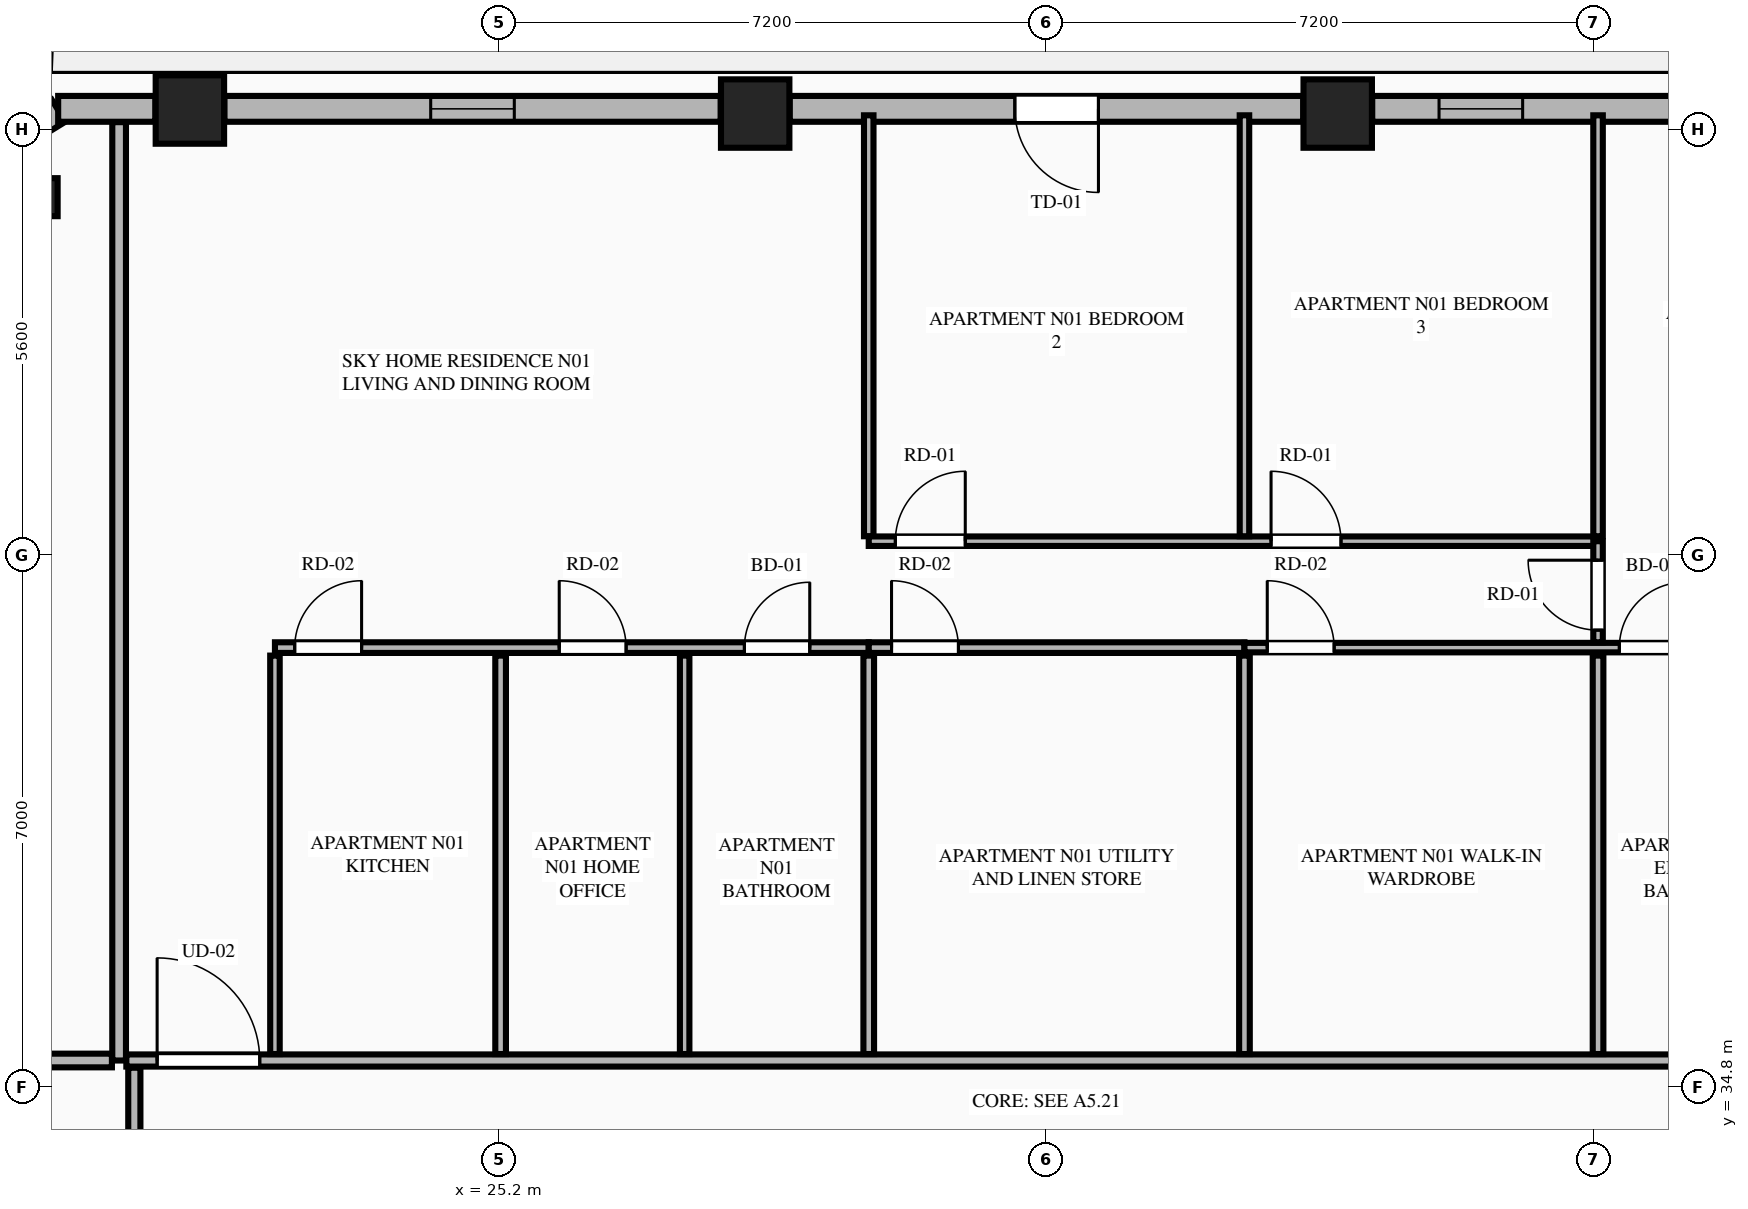
"""IFC4 building model, lengths in metres.
Left out: names, types, materials, properties, quantities, classifications, styles, units other than length and angle.
Written with IfcOpenShell. Run it as: python <this file> out.ifc"""

import sys

from ifc_helpers import new_model, si_unit, direction, frame, frame_2d, origin, origin_2d, place, context, subcontext, project, spatial, rectangle, extrude, element, fill, save


model = new_model("IFC4")
c1 = context("Model", 3, precision=1e-05, world=origin(), true_north=direction((0.0, 1.0)))
c2 = subcontext(c1, "Body", "Model", "MODEL_VIEW")
j1 = project(units=[si_unit("LENGTHUNIT", "METRE"), si_unit("PLANEANGLEUNIT", "RADIAN")], contexts=[c1])
p1 = place(None, origin())
s1 = spatial("IfcSite", under=j1, at=p1, CompositionType="ELEMENT")
p2 = place(p1, origin())
s2 = spatial("IfcBuilding", under=s1, at=p2, CompositionType="ELEMENT")
p3 = place(p2, frame((0.0, 0.0, 160.6)))
s3 = spatial("IfcBuildingStorey", under=s2, at=p3, CompositionType="ELEMENT", Elevation=160.6)
for number, where, z_axis, x_axis in (
    (1, (36.232, 47.608, 0.0), (0.0, 0.0, 1.0), (1.0, 0.0, 0.0)),
    (2, (28.568, 47.608, 0.0), (0.0, 0.0, 1.0), (1.0, 0.0, 0.0)),
    (3, (21.131, 47.661, 0.0), (0.0, 0.0, 1.0), (1.0, 0.0, 0.0)),
):
    element("IfcColumn", number, at=place(p3, frame(where, z_axis=z_axis, x_axis=x_axis)), inside=s3, PredefinedType="COLUMN", context=c2, shape_type="SweptSolid", body=[
        extrude(rectangle(XDim=0.9, YDim=0.9, at=origin_2d()), origin(), (0.0, 0.0, 1.0), 3.55),
    ])
p4 = place(p3, frame((19.141, 46.508, 0.0), z_axis=(0.0, 0.0, 1.0), x_axis=(-0.865160173452, -0.501495637342, 0.0)))
e4 = element("IfcColumn", 4, at=p4, inside=s3, PredefinedType="PILASTER", context=c2, shape_type="SweptSolid", body=[
    extrude(rectangle(XDim=0.5, YDim=0.35, at=origin_2d()), origin(), (0.0, 0.0, 1.0), 3.55),
])
p5 = place(p3, frame((19.403, 47.645, 0.0), z_axis=(0.0, 0.0, 1.0), x_axis=(-0.851798915137, -0.523868884523, 0.0)))
e5 = element("IfcWall", 5, at=p5, inside=s3, PredefinedType="STANDARD", context=c2, shape_type="SweptSolid", body=[
    extrude(rectangle(XDim=1.848, YDim=0.34, at=frame_2d((0.924, 0.0))), origin(), (0.0, 0.0, 1.0), 3.34),
])
p6 = place(p3, frame((43.215, 47.67, 0.0), z_axis=(0.0, 0.0, 1.0), x_axis=(-1.0, 0.0, 0.0)))
e6 = element("IfcWall", 6, at=p6, inside=s3, PredefinedType="STANDARD", context=c2, shape_type="SweptSolid", body=[
    extrude(rectangle(XDim=6.529, YDim=0.34, at=frame_2d((3.265, 0.0))), origin(), (0.0, 0.0, 1.0), 2.797),
])
p7 = place(p6, frame((1.173, 0.0, 0.75)))
e7 = element("IfcOpeningElement", 7, at=p7, cuts=e6, PredefinedType="OPENING", context=c2, shape_type="SweptSolid", body=[
    extrude(rectangle(XDim=1.1, YDim=1.897, at=frame_2d((0.55, 0.948))), frame((0.0, 0.18, 0.0), z_axis=(0.0, -1.0, 0.0), x_axis=(1.0, 0.0, 0.0)), (0.0, 0.0, 1.0), 0.36),
])
p8 = place(p6, frame((4.55, 0.0, 0.75)))
e8 = element("IfcOpeningElement", 8, at=p8, cuts=e6, PredefinedType="OPENING", context=c2, shape_type="SweptSolid", body=[
    extrude(rectangle(XDim=1.1, YDim=1.897, at=frame_2d((0.55, 0.948))), frame((0.0, 0.18, 0.0), z_axis=(0.0, -1.0, 0.0), x_axis=(1.0, 0.0, 0.0)), (0.0, 0.0, 1.0), 0.36),
])
p9 = place(p3, frame((35.778, 47.67, 0.0), z_axis=(0.0, 0.0, 1.0), x_axis=(-1.0, 0.0, 0.0)))
e9 = element("IfcWall", 9, at=p9, inside=s3, PredefinedType="STANDARD", context=c2, shape_type="SweptSolid", body=[
    extrude(rectangle(XDim=6.756, YDim=0.34, at=frame_2d((3.378, 0.0))), origin(), (0.0, 0.0, 1.0), 2.797),
])
p10 = place(p9, frame((2.694, 0.0, 0.0)))
e10 = element("IfcOpeningElement", 10, at=p10, cuts=e9, PredefinedType="OPENING", context=c2, shape_type="SweptSolid", body=[
    extrude(rectangle(XDim=1.1, YDim=2.25, at=frame_2d((0.55, 1.125))), frame((0.0, 0.18, 0.0), z_axis=(0.0, -1.0, 0.0), x_axis=(1.0, 0.0, 0.0)), (0.0, 0.0, 1.0), 0.36),
])
p11 = place(p3, frame((28.114, 47.67, 0.0), z_axis=(0.0, 0.0, 1.0), x_axis=(-1.0, 0.0, 0.0)))
e11 = element("IfcWall", 11, at=p11, inside=s3, PredefinedType="STANDARD", context=c2, shape_type="SweptSolid", body=[
    extrude(rectangle(XDim=6.529, YDim=0.34, at=frame_2d((3.265, 0.0))), origin(), (0.0, 0.0, 1.0), 2.797),
])
p12 = place(p11, frame((2.715, 0.0, 0.75)))
e12 = element("IfcOpeningElement", 12, at=p12, cuts=e11, PredefinedType="OPENING", context=c2, shape_type="SweptSolid", body=[
    extrude(rectangle(XDim=1.1, YDim=1.897, at=frame_2d((0.55, 0.948))), frame((0.0, 0.18, 0.0), z_axis=(0.0, -1.0, 0.0), x_axis=(1.0, 0.0, 0.0)), (0.0, 0.0, 1.0), 0.36),
])
p13 = place(p3, frame((20.677, 47.67, 0.0), z_axis=(0.0, 0.0, 1.0), x_axis=(-1.0, 0.0, 0.0)))
e13 = element("IfcWall", 13, at=p13, inside=s3, PredefinedType="STANDARD", context=c2, shape_type="SweptSolid", body=[
    extrude(rectangle(XDim=1.279, YDim=0.34, at=frame_2d((0.64, 0.0))), origin(), (0.0, 0.0, 1.0), 3.34),
])
p14 = place(p3, frame((20.2, 35.15, 0.0), z_axis=(0.0, 0.0, 1.0), x_axis=(0.0, 1.0, 0.0)))
e14 = element("IfcWall", 14, at=p14, inside=s3, PredefinedType="PARTITIONING", context=c2, shape_type="SweptSolid", body=[
    extrude(rectangle(XDim=12.345, YDim=0.18, at=frame_2d((6.173, 0.0))), origin(), (0.0, 0.0, 1.0), 3.34),
])
p15 = place(p3, frame((20.295, 35.15, 0.0), z_axis=(0.0, 0.0, 1.0), x_axis=(1.0, 0.0, 0.0)))
e15 = element("IfcWall", 15, at=p15, inside=s3, PredefinedType="PARTITIONING", context=c2, shape_type="SweptSolid", body=[
    extrude(rectangle(XDim=24.21, YDim=0.16, at=frame_2d((12.105, 0.0))), origin(), (0.0, 0.0, 1.0), 3.34),
])
p16 = place(p15, frame((0.405, 0.0, 0.0)))
e16 = element("IfcOpeningElement", 16, at=p16, cuts=e15, PredefinedType="OPENING", context=c2, shape_type="SweptSolid", body=[
    extrude(rectangle(XDim=1.35, YDim=2.35, at=frame_2d((0.675, 1.175))), frame((0.0, 0.09, 0.0), z_axis=(0.0, -1.0, 0.0), x_axis=(1.0, 0.0, 0.0)), (0.0, 0.0, 1.0), 0.18),
])
p17 = place(p3, frame((22.25, 35.235, 0.0), z_axis=(0.0, 0.0, 1.0), x_axis=(0.0, 1.0, 0.0)))
e17 = element("IfcWall", 17, at=p17, inside=s3, PredefinedType="PARTITIONING", context=c2, shape_type="SweptSolid", body=[
    extrude(rectangle(XDim=5.242, YDim=0.125, at=frame_2d((2.621, 0.0))), origin(), (0.0, 0.0, 1.0), 2.722),
])
p18 = place(p3, frame((22.25, 40.582, 0.0), z_axis=(0.0, 0.0, 1.0), x_axis=(1.0, 0.0, 0.0)))
e18 = element("IfcWall", 18, at=p18, inside=s3, PredefinedType="PLUMBINGWALL", context=c2, shape_type="SweptSolid", body=[
    extrude(rectangle(XDim=7.812, YDim=0.14, at=frame_2d((3.906, 0.0))), origin(), (0.0, 0.0, 1.0), 3.34),
])
p19 = place(p18, frame((6.176, 0.0, 0.0)))
e19 = element("IfcOpeningElement", 19, at=p19, cuts=e18, PredefinedType="OPENING", context=c2, shape_type="SweptSolid", body=[
    extrude(rectangle(XDim=0.86, YDim=2.1, at=frame_2d((0.43, 1.05))), frame((0.0, 0.08, 0.0), z_axis=(0.0, -1.0, 0.0), x_axis=(1.0, 0.0, 0.0)), (0.0, 0.0, 1.0), 0.16),
])
p20 = place(p18, frame((0.26, 0.0, 0.0)))
e20 = element("IfcOpeningElement", 20, at=p20, cuts=e18, PredefinedType="OPENING", context=c2, shape_type="SweptSolid", body=[
    extrude(rectangle(XDim=0.88, YDim=2.15, at=frame_2d((0.44, 1.075))), frame((0.0, 0.08, 0.0), z_axis=(0.0, -1.0, 0.0), x_axis=(1.0, 0.0, 0.0)), (0.0, 0.0, 1.0), 0.16),
])
p21 = place(p18, frame((3.74, 0.0, 0.0)))
e21 = element("IfcOpeningElement", 21, at=p21, cuts=e18, PredefinedType="OPENING", context=c2, shape_type="SweptSolid", body=[
    extrude(rectangle(XDim=0.88, YDim=2.15, at=frame_2d((0.44, 1.075))), frame((0.0, 0.08, 0.0), z_axis=(0.0, -1.0, 0.0), x_axis=(1.0, 0.0, 0.0)), (0.0, 0.0, 1.0), 0.16),
])
p22 = place(p3, frame((30.062, 40.582, 0.0), z_axis=(0.0, 0.0, 1.0), x_axis=(1.0, 0.0, 0.0)))
e22 = element("IfcWall", 22, at=p22, inside=s3, PredefinedType="PLUMBINGWALL", context=c2, shape_type="SweptSolid", body=[
    extrude(rectangle(XDim=4.943, YDim=0.14, at=frame_2d((2.471, 0.0))), origin(), (0.0, 0.0, 1.0), 3.34),
])
p23 = place(p22, frame((0.3, 0.0, 0.0)))
e23 = element("IfcOpeningElement", 23, at=p23, cuts=e22, PredefinedType="OPENING", context=c2, shape_type="SweptSolid", body=[
    extrude(rectangle(XDim=0.88, YDim=2.15, at=frame_2d((0.44, 1.075))), frame((0.0, 0.08, 0.0), z_axis=(0.0, -1.0, 0.0), x_axis=(1.0, 0.0, 0.0)), (0.0, 0.0, 1.0), 0.16),
])
p24 = place(p3, frame((35.005, 40.582, 0.0), z_axis=(0.0, 0.0, 1.0), x_axis=(1.0, 0.0, 0.0)))
e24 = element("IfcWall", 24, at=p24, inside=s3, PredefinedType="PARTITIONING", context=c2, shape_type="SweptSolid", body=[
    extrude(rectangle(XDim=9.5, YDim=0.125, at=frame_2d((4.75, 0.0))), origin(), (0.0, 0.0, 1.0), 3.34),
])
p25 = place(p24, frame((4.932, 0.0, 0.0)))
e25 = element("IfcOpeningElement", 25, at=p25, cuts=e24, PredefinedType="OPENING", context=c2, shape_type="SweptSolid", body=[
    extrude(rectangle(XDim=0.86, YDim=2.1, at=frame_2d((0.43, 1.05))), frame((0.0, 0.073, 0.0), z_axis=(0.0, -1.0, 0.0), x_axis=(1.0, 0.0, 0.0)), (0.0, 0.0, 1.0), 0.145),
])
p26 = place(p24, frame((7.55, 0.0, 0.0)))
e26 = element("IfcOpeningElement", 26, at=p26, cuts=e24, PredefinedType="OPENING", context=c2, shape_type="SweptSolid", body=[
    extrude(rectangle(XDim=0.88, YDim=2.15, at=frame_2d((0.44, 1.075))), frame((0.0, 0.073, 0.0), z_axis=(0.0, -1.0, 0.0), x_axis=(1.0, 0.0, 0.0)), (0.0, 0.0, 1.0), 0.145),
])
p27 = place(p24, frame((0.3, 0.0, 0.0)))
e27 = element("IfcOpeningElement", 27, at=p27, cuts=e24, PredefinedType="OPENING", context=c2, shape_type="SweptSolid", body=[
    extrude(rectangle(XDim=0.88, YDim=2.15, at=frame_2d((0.44, 1.075))), frame((0.0, 0.073, 0.0), z_axis=(0.0, -1.0, 0.0), x_axis=(1.0, 0.0, 0.0)), (0.0, 0.0, 1.0), 0.145),
])
p28 = place(p3, frame((25.219, 35.235, 0.0), z_axis=(0.0, 0.0, 1.0), x_axis=(0.0, 1.0, 0.0)))
e28 = element("IfcWall", 28, at=p28, inside=s3, PredefinedType="PLUMBINGWALL", context=c2, shape_type="SweptSolid", body=[
    extrude(rectangle(XDim=5.242, YDim=0.14, at=frame_2d((2.621, 0.0))), origin(), (0.0, 0.0, 1.0), 3.34),
])
p29 = place(p3, frame((27.64, 35.235, 0.0), z_axis=(0.0, 0.0, 1.0), x_axis=(0.0, 1.0, 0.0)))
e29 = element("IfcWall", 29, at=p29, inside=s3, PredefinedType="PARTITIONING", context=c2, shape_type="SweptSolid", body=[
    extrude(rectangle(XDim=5.242, YDim=0.125, at=frame_2d((2.621, 0.0))), origin(), (0.0, 0.0, 1.0), 3.34),
])
p30 = place(p3, frame((30.062, 42.047, 0.0), z_axis=(0.0, 0.0, 1.0), x_axis=(0.0, 1.0, 0.0)))
e30 = element("IfcWall", 30, at=p30, inside=s3, PredefinedType="PARTITIONING", context=c2, shape_type="SweptSolid", body=[
    extrude(rectangle(XDim=5.538, YDim=0.125, at=frame_2d((2.769, 0.0))), origin(), (0.0, 0.0, 1.0), 3.34),
])
p31 = place(p3, frame((30.062, 41.982, 0.0), z_axis=(0.0, 0.0, 1.0), x_axis=(1.0, 0.0, 0.0)))
e31 = element("IfcWall", 31, at=p31, inside=s3, PredefinedType="PARTITIONING", context=c2, shape_type="SweptSolid", body=[
    extrude(rectangle(XDim=9.595, YDim=0.125, at=frame_2d((4.797, 0.0))), origin(), (0.0, 0.0, 1.0), 3.34),
])
p32 = place(p31, frame((0.35, 0.0, 0.0)))
e32 = element("IfcOpeningElement", 32, at=p32, cuts=e31, PredefinedType="OPENING", context=c2, shape_type="SweptSolid", body=[
    extrude(rectangle(XDim=0.92, YDim=2.15, at=frame_2d((0.46, 1.075))), frame((0.0, 0.073, 0.0), z_axis=(0.0, -1.0, 0.0), x_axis=(1.0, 0.0, 0.0)), (0.0, 0.0, 1.0), 0.145),
])
p33 = place(p31, frame((5.293, 0.0, 0.0)))
e33 = element("IfcOpeningElement", 33, at=p33, cuts=e31, PredefinedType="OPENING", context=c2, shape_type="SweptSolid", body=[
    extrude(rectangle(XDim=0.92, YDim=2.15, at=frame_2d((0.46, 1.075))), frame((0.0, 0.073, 0.0), z_axis=(0.0, -1.0, 0.0), x_axis=(1.0, 0.0, 0.0)), (0.0, 0.0, 1.0), 0.145),
])
p34 = place(p3, frame((39.657, 40.652, 0.0), z_axis=(0.0, 0.0, 1.0), x_axis=(0.0, 1.0, 0.0)))
e34 = element("IfcWall", 34, at=p34, inside=s3, PredefinedType="PARTITIONING", context=c2, shape_type="SweptSolid", body=[
    extrude(rectangle(XDim=1.33, YDim=0.125, at=frame_2d((0.665, 0.0))), origin(), (0.0, 0.0, 1.0), 3.34),
])
p35 = place(p34, frame((0.16, 0.0, 0.0)))
e35 = element("IfcOpeningElement", 35, at=p35, cuts=e34, PredefinedType="OPENING", context=c2, shape_type="SweptSolid", body=[
    extrude(rectangle(XDim=0.92, YDim=2.15, at=frame_2d((0.46, 1.075))), frame((0.0, 0.073, 0.0), z_axis=(0.0, -1.0, 0.0), x_axis=(1.0, 0.0, 0.0)), (0.0, 0.0, 1.0), 0.145),
])
for number, where, z_axis, x_axis in (
    (36, (30.062, 35.235, 0.0), (0.0, 0.0, 1.0), (0.0, 1.0, 0.0)),
    (37, (35.005, 35.235, 0.0), (0.0, 0.0, 1.0), (0.0, 1.0, 0.0)),
):
    element("IfcWall", number, at=place(p3, frame(where, z_axis=z_axis, x_axis=x_axis)), inside=s3, PredefinedType="PLUMBINGWALL", context=c2, shape_type="SweptSolid", body=[
        extrude(rectangle(XDim=5.242, YDim=0.14, at=frame_2d((2.621, 0.0))), origin(), (0.0, 0.0, 1.0), 3.34),
    ])
for number, where, z_axis, x_axis in (
    (38, (35.005, 42.047, 0.0), (0.0, 0.0, 1.0), (0.0, 1.0, 0.0)),
    (39, (39.657, 42.047, 0.0), (0.0, 0.0, 1.0), (0.0, 1.0, 0.0)),
):
    element("IfcWall", number, at=place(p3, frame(where, z_axis=z_axis, x_axis=x_axis)), inside=s3, PredefinedType="PARTITIONING", context=c2, shape_type="SweptSolid", body=[
        extrude(rectangle(XDim=5.538, YDim=0.125, at=frame_2d((2.769, 0.0))), origin(), (0.0, 0.0, 1.0), 3.34),
    ])
p36 = place(p3, frame((39.657, 35.235, 0.0), z_axis=(0.0, 0.0, 1.0), x_axis=(0.0, 1.0, 0.0)))
e40 = element("IfcWall", 40, at=p36, inside=s3, PredefinedType="PLUMBINGWALL", context=c2, shape_type="SweptSolid", body=[
    extrude(rectangle(XDim=5.242, YDim=0.14, at=frame_2d((2.621, 0.0))), origin(), (0.0, 0.0, 1.0), 3.34),
])
p37 = place(p3, frame((12.21, 35.15, 0.0), z_axis=(0.0, 0.0, 1.0), x_axis=(1.0, 0.0, 0.0)))
e41 = element("IfcWall", 41, at=p37, inside=s3, PredefinedType="PARTITIONING", context=c2, shape_type="SweptSolid", body=[
    extrude(rectangle(XDim=7.895, YDim=0.18, at=frame_2d((3.948, 0.0))), origin(), (0.0, 0.0, 1.0), 3.34),
])
p38 = place(p3, frame((20.4, 16.745, 0.0), z_axis=(0.0, 0.0, 1.0), x_axis=(0.0, 1.0, 0.0)))
e42 = element("IfcWall", 42, at=p38, inside=s3, PredefinedType="PARTITIONING", context=c2, shape_type="SweptSolid", body=[
    extrude(rectangle(XDim=18.31, YDim=0.16, at=frame_2d((9.155, 0.0))), origin(), (0.0, 0.0, 1.0), 3.34),
])
p39 = place(p38, frame((0.4, 0.0, 0.0)))
e43 = element("IfcOpeningElement", 43, at=p39, cuts=e42, PredefinedType="OPENING", context=c2, shape_type="SweptSolid", body=[
    extrude(rectangle(XDim=1.02, YDim=2.25, at=frame_2d((0.51, 1.125))), frame((0.0, 0.09, 0.0), z_axis=(0.0, -1.0, 0.0), x_axis=(1.0, 0.0, 0.0)), (0.0, 0.0, 1.0), 0.18),
])
p40 = place(p10, origin())
e44 = element("IfcDoor", 44, at=p40, inside=s3, OperationType="SINGLE_SWING_LEFT", PredefinedType="DOOR", context=c2, shape_type="SweptSolid", body=[
    extrude(rectangle(XDim=1.1, YDim=2.25, at=frame_2d((0.55, 1.125))), frame((0.0, 0.025, 0.0), z_axis=(0.0, -1.0, 0.0), x_axis=(1.0, 0.0, 0.0)), (0.0, 0.0, 1.0), 0.05),
])
fill(e10, e44)
p41 = place(p12, origin())
e45 = element("IfcWindow", 45, at=p41, inside=s3, PartitioningType="SINGLE_PANEL", PredefinedType="WINDOW", context=c2, shape_type="SweptSolid", body=[
    extrude(rectangle(XDim=1.1, YDim=1.897, at=frame_2d((0.55, 0.948))), frame((0.0, 0.03, 0.0), z_axis=(0.0, -1.0, 0.0), x_axis=(1.0, 0.0, 0.0)), (0.0, 0.0, 1.0), 0.06),
])
fill(e12, e45)
p42 = place(p19, origin())
e46 = element("IfcDoor", 46, at=p42, inside=s3, OperationType="SINGLE_SWING_RIGHT", PredefinedType="DOOR", context=c2, shape_type="SweptSolid", body=[
    extrude(rectangle(XDim=0.86, YDim=2.1, at=frame_2d((0.43, 1.05))), frame((0.0, 0.025, 0.0), z_axis=(0.0, -1.0, 0.0), x_axis=(1.0, 0.0, 0.0)), (0.0, 0.0, 1.0), 0.05),
])
fill(e19, e46)
p43 = place(p25, origin())
e47 = element("IfcDoor", 47, at=p43, inside=s3, OperationType="SINGLE_SWING_RIGHT", PredefinedType="DOOR", context=c2, shape_type="SweptSolid", body=[
    extrude(rectangle(XDim=0.86, YDim=2.1, at=frame_2d((0.43, 1.05))), frame((0.0, 0.025, 0.0), z_axis=(0.0, -1.0, 0.0), x_axis=(1.0, 0.0, 0.0)), (0.0, 0.0, 1.0), 0.05),
])
fill(e25, e47)
p44 = place(p16, origin())
e48 = element("IfcDoor", 48, at=p44, inside=s3, OperationType="SINGLE_SWING_LEFT", PredefinedType="DOOR", context=c2, shape_type="SweptSolid", body=[
    extrude(rectangle(XDim=1.35, YDim=2.35, at=frame_2d((0.675, 1.175))), frame((0.0, 0.025, 0.0), z_axis=(0.0, -1.0, 0.0), x_axis=(1.0, 0.0, 0.0)), (0.0, 0.0, 1.0), 0.05),
])
fill(e16, e48)
p45 = place(p20, origin())
e49 = element("IfcDoor", 49, at=p45, inside=s3, OperationType="SINGLE_SWING_RIGHT", PredefinedType="DOOR", context=c2, shape_type="SweptSolid", body=[
    extrude(rectangle(XDim=0.88, YDim=2.15, at=frame_2d((0.44, 1.075))), frame((0.0, 0.025, 0.0), z_axis=(0.0, -1.0, 0.0), x_axis=(1.0, 0.0, 0.0)), (0.0, 0.0, 1.0), 0.05),
])
fill(e20, e49)
p46 = place(p21, origin())
e50 = element("IfcDoor", 50, at=p46, inside=s3, OperationType="SINGLE_SWING_LEFT", PredefinedType="DOOR", context=c2, shape_type="SweptSolid", body=[
    extrude(rectangle(XDim=0.88, YDim=2.15, at=frame_2d((0.44, 1.075))), frame((0.0, 0.025, 0.0), z_axis=(0.0, -1.0, 0.0), x_axis=(1.0, 0.0, 0.0)), (0.0, 0.0, 1.0), 0.05),
])
fill(e21, e50)
p47 = place(p23, origin())
e51 = element("IfcDoor", 51, at=p47, inside=s3, OperationType="SINGLE_SWING_LEFT", PredefinedType="DOOR", context=c2, shape_type="SweptSolid", body=[
    extrude(rectangle(XDim=0.88, YDim=2.15, at=frame_2d((0.44, 1.075))), frame((0.0, 0.025, 0.0), z_axis=(0.0, -1.0, 0.0), x_axis=(1.0, 0.0, 0.0)), (0.0, 0.0, 1.0), 0.05),
])
fill(e23, e51)
p48 = place(p32, origin())
e52 = element("IfcDoor", 52, at=p48, inside=s3, OperationType="SINGLE_SWING_RIGHT", PredefinedType="DOOR", context=c2, shape_type="SweptSolid", body=[
    extrude(rectangle(XDim=0.92, YDim=2.15, at=frame_2d((0.46, 1.075))), frame((0.0, 0.025, 0.0), z_axis=(0.0, -1.0, 0.0), x_axis=(1.0, 0.0, 0.0)), (0.0, 0.0, 1.0), 0.05),
])
fill(e32, e52)
p49 = place(p33, origin())
e53 = element("IfcDoor", 53, at=p49, inside=s3, OperationType="SINGLE_SWING_LEFT", PredefinedType="DOOR", context=c2, shape_type="SweptSolid", body=[
    extrude(rectangle(XDim=0.92, YDim=2.15, at=frame_2d((0.46, 1.075))), frame((0.0, 0.025, 0.0), z_axis=(0.0, -1.0, 0.0), x_axis=(1.0, 0.0, 0.0)), (0.0, 0.0, 1.0), 0.05),
])
fill(e33, e53)
p50 = place(p35, origin())
e54 = element("IfcDoor", 54, at=p50, inside=s3, OperationType="SINGLE_SWING_RIGHT", PredefinedType="DOOR", context=c2, shape_type="SweptSolid", body=[
    extrude(rectangle(XDim=0.92, YDim=2.15, at=frame_2d((0.46, 1.075))), frame((0.0, 0.025, 0.0), z_axis=(0.0, -1.0, 0.0), x_axis=(1.0, 0.0, 0.0)), (0.0, 0.0, 1.0), 0.05),
])
fill(e35, e54)
p51 = place(p27, origin())
e55 = element("IfcDoor", 55, at=p51, inside=s3, OperationType="SINGLE_SWING_LEFT", PredefinedType="DOOR", context=c2, shape_type="SweptSolid", body=[
    extrude(rectangle(XDim=0.88, YDim=2.15, at=frame_2d((0.44, 1.075))), frame((0.0, 0.025, 0.0), z_axis=(0.0, -1.0, 0.0), x_axis=(1.0, 0.0, 0.0)), (0.0, 0.0, 1.0), 0.05),
])
fill(e27, e55)
p52 = place(p8, origin())
e56 = element("IfcWindow", 56, at=p52, inside=s3, PartitioningType="SINGLE_PANEL", PredefinedType="WINDOW", context=c2, shape_type="SweptSolid", body=[
    extrude(rectangle(XDim=1.1, YDim=1.897, at=frame_2d((0.55, 0.948))), frame((0.0, 0.03, 0.0), z_axis=(0.0, -1.0, 0.0), x_axis=(1.0, 0.0, 0.0)), (0.0, 0.0, 1.0), 0.06),
])
fill(e8, e56)
save(model, sys.argv[1])
